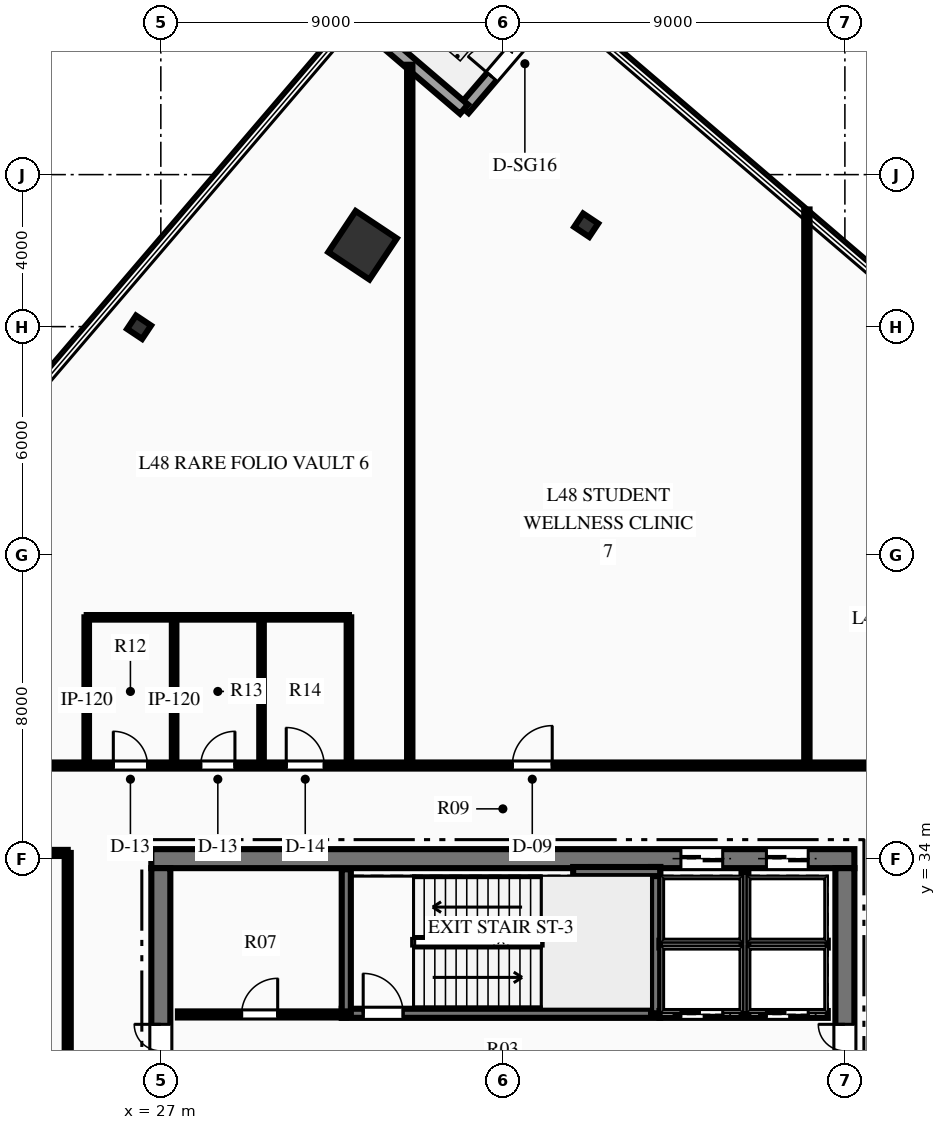
"""IFC4 building model, lengths in metres.
Left out: names, types, materials, properties, quantities, classifications, styles, units other than length and angle.
Written with IfcOpenShell. Run it as: python <this file> out.ifc"""

import sys

from ifc_helpers import new_model, si_unit, direction, frame, frame_2d, origin, origin_2d, place, context, subcontext, project, spatial, rectangle, hollow_rectangle, i_section, extrude, element, fill, save


model = new_model("IFC4")
c1 = context("Model", 3, precision=1e-05, world=origin(), true_north=direction((0.0, 1.0)))
c2 = subcontext(c1, "Body", "Model", "MODEL_VIEW")
j1 = project(units=[si_unit("LENGTHUNIT", "METRE"), si_unit("PLANEANGLEUNIT", "RADIAN")], contexts=[c1])
p1 = place(None, origin())
s1 = spatial("IfcSite", under=j1, at=p1, CompositionType="ELEMENT")
p2 = place(p1, origin())
s2 = spatial("IfcBuilding", under=s1, at=p2, CompositionType="ELEMENT")
p3 = place(p2, frame((0.0, 0.0, 193.95)))
s3 = spatial("IfcBuildingStorey", under=s2, at=p3, CompositionType="ELEMENT", Elevation=193.95)
p4 = place(p3, frame((26.75, 34.0, 0.0), z_axis=(0.0, 0.0, 1.0), x_axis=(1.0, 0.0, 0.0)))
e1 = element("IfcWall", 1, at=p4, inside=s3, PredefinedType="SHEAR", context=c2, shape_type="SweptSolid", body=[
    extrude(rectangle(XDim=18.5, YDim=0.5, at=frame_2d((9.25, 0.0))), origin(), (0.0, 0.0, 1.0), 4.5),
])
p5 = place(p4, frame((13.935, 0.0, 0.0)))
e2 = element("IfcOpeningElement", 2, at=p5, cuts=e1, PredefinedType="OPENING", context=c2, shape_type="SweptSolid", body=[
    extrude(rectangle(XDim=1.1, YDim=2.15, at=frame_2d((0.55, 1.075))), frame((0.0, 0.26, 0.0), z_axis=(0.0, -1.0, 0.0), x_axis=(1.0, 0.0, 0.0)), (0.0, 0.0, 1.0), 0.52),
])
p6 = place(p4, frame((16.185, 0.0, 0.0)))
e3 = element("IfcOpeningElement", 3, at=p6, cuts=e1, PredefinedType="OPENING", context=c2, shape_type="SweptSolid", body=[
    extrude(rectangle(XDim=1.1, YDim=2.15, at=frame_2d((0.55, 1.075))), frame((0.0, 0.26, 0.0), z_axis=(0.0, -1.0, 0.0), x_axis=(1.0, 0.0, 0.0)), (0.0, 0.0, 1.0), 0.52),
])
p7 = place(p3, frame((27.0, 18.25, 0.0), z_axis=(0.0, 0.0, 1.0), x_axis=(0.0, 1.0, 0.0)))
e4 = element("IfcWall", 4, at=p7, inside=s3, PredefinedType="SHEAR", context=c2, shape_type="SweptSolid", body=[
    extrude(rectangle(XDim=15.5, YDim=0.5, at=frame_2d((7.75, 0.0))), origin(), (0.0, 0.0, 1.0), 4.5),
])
p8 = place(p7, frame((9.99, 0.0, 0.0)))
e5 = element("IfcOpeningElement", 5, at=p8, cuts=e4, PredefinedType="OPENING", context=c2, shape_type="SweptSolid", body=[
    extrude(rectangle(XDim=1.4, YDim=2.2, at=frame_2d((0.7, 1.1))), frame((0.0, 0.26, 0.0), z_axis=(0.0, -1.0, 0.0), x_axis=(1.0, 0.0, 0.0)), (0.0, 0.0, 1.0), 0.52),
])
p9 = place(p3, frame((45.0, 18.25, 0.0), z_axis=(0.0, 0.0, 1.0), x_axis=(0.0, 1.0, 0.0)))
e6 = element("IfcWall", 6, at=p9, inside=s3, PredefinedType="SHEAR", context=c2, shape_type="SweptSolid", body=[
    extrude(rectangle(XDim=15.5, YDim=0.5, at=frame_2d((7.75, 0.0))), origin(), (0.0, 0.0, 1.0), 4.5),
])
p10 = place(p9, frame((9.99, 0.0, 0.0)))
e7 = element("IfcOpeningElement", 7, at=p10, cuts=e6, PredefinedType="OPENING", context=c2, shape_type="SweptSolid", body=[
    extrude(rectangle(XDim=1.4, YDim=2.2, at=frame_2d((0.7, 1.1))), frame((0.0, 0.26, 0.0), z_axis=(0.0, -1.0, 0.0), x_axis=(1.0, 0.0, 0.0)), (0.0, 0.0, 1.0), 0.52),
])
p11 = place(p3, frame((31.76, 29.93, 0.0), z_axis=(0.0, 0.0, 1.0), x_axis=(1.0, 0.0, 0.0)))
e8 = element("IfcWall", 8, at=p11, inside=s3, PredefinedType="SHEAR", context=c2, shape_type="SweptSolid", body=[
    extrude(rectangle(XDim=8.38, YDim=0.24, at=frame_2d((4.19, 0.0))), origin(), (0.0, 0.0, 1.0), 4.5),
])
p12 = place(p11, frame((0.565, 0.0, 0.0)))
e9 = element("IfcOpeningElement", 9, at=p12, cuts=e8, PredefinedType="OPENING", context=c2, shape_type="SweptSolid", body=[
    extrude(rectangle(XDim=1.05, YDim=2.15, at=frame_2d((0.525, 1.075))), frame((0.0, 0.13, 0.0), z_axis=(0.0, -1.0, 0.0), x_axis=(1.0, 0.0, 0.0)), (0.0, 0.0, 1.0), 0.26),
])
p13 = place(p3, frame((31.88, 29.93, 0.0), z_axis=(0.0, 0.0, 1.0), x_axis=(0.0, 1.0, 0.0)))
e10 = element("IfcWall", 10, at=p13, inside=s3, PredefinedType="SHEAR", context=c2, shape_type="SweptSolid", body=[
    extrude(rectangle(XDim=3.79, YDim=0.24, at=frame_2d((1.895, 0.0))), origin(), (0.0, 0.0, 1.0), 4.5),
])
p14 = place(p3, frame((40.02, 29.93, 0.0), z_axis=(0.0, 0.0, 1.0), x_axis=(0.0, 1.0, 0.0)))
e11 = element("IfcWall", 11, at=p14, inside=s3, PredefinedType="SHEAR", context=c2, shape_type="SweptSolid", body=[
    extrude(rectangle(XDim=3.85, YDim=0.24, at=frame_2d((1.925, 0.0))), origin(), (0.0, 0.0, 1.0), 4.5),
])
p15 = place(p3, frame((37.85, 33.66, 0.0), z_axis=(0.0, 0.0, 1.0), x_axis=(1.0, 0.0, 0.0)))
e12 = element("IfcWall", 12, at=p15, inside=s3, PredefinedType="SHEAR", context=c2, shape_type="SweptSolid", body=[
    extrude(rectangle(XDim=2.29, YDim=0.24, at=frame_2d((1.145, 0.0))), origin(), (0.0, 0.0, 1.0), 4.5),
])
p16 = place(p3, frame((32.308, 50.141, 0.0), z_axis=(0.0, 0.0, 1.0), x_axis=(0.554118199338, 0.832437998389, 0.0)))
e13 = element("IfcColumn", 13, at=p16, inside=s3, PredefinedType="COLUMN", context=c2, shape_type="SweptSolid", body=[
    extrude(hollow_rectangle(XDim=1.3, YDim=1.3, WallThickness=0.06, at=origin_2d()), origin(), (0.0, 0.0, 1.0), 4.5),
])
for number, where, z_axis, x_axis in (
    (14, (38.193, 50.668, 0.0), (0.0, 0.0, 1.0), (0.554, 0.832, 0.0)),
    (15, (26.428, 47.984, 0.0), (0.0, 0.0, 1.0), (0.554, 0.832, 0.0)),
):
    element("IfcColumn", number, at=place(p3, frame(where, z_axis=z_axis, x_axis=x_axis)), inside=s3, PredefinedType="COLUMN", context=c2, shape_type="SweptSolid", body=[
        extrude(i_section(OverallWidth=0.424, OverallDepth=0.474, WebThickness=0.048, FlangeThickness=0.077, at=origin_2d()), origin(), (0.0, 0.0, 1.0), 4.5),
    ])
p17 = place(p3, frame((34.977, 53.723, 0.0), z_axis=(0.0, 0.0, 1.0), x_axis=(0.650105449276, 0.759844000319, 0.0)))
e16 = element("IfcWall", 16, at=p17, inside=s3, PredefinedType="STANDARD", context=c2, shape_type="SweptSolid", body=[
    extrude(rectangle(XDim=3.9, YDim=0.32, at=frame_2d((1.95, 0.0))), origin(), (0.0, 0.0, 1.0), 4.22),
])
p18 = place(p17, frame((1.125, 0.0, 0.0)))
e17 = element("IfcOpeningElement", 17, at=p18, cuts=e16, PredefinedType="OPENING", context=c2, shape_type="SweptSolid", body=[
    extrude(rectangle(XDim=1.65, YDim=2.35, at=frame_2d((0.825, 1.175))), frame((0.0, 0.17, 0.0), z_axis=(0.0, -1.0, 0.0), x_axis=(1.0, 0.0, 0.0)), (0.0, 0.0, 1.0), 0.34),
])
p19 = place(p3, frame((32.014, 56.258, 0.0), z_axis=(0.0, 0.0, 1.0), x_axis=(0.759844000319, -0.650105449276, 0.0)))
e18 = element("IfcWall", 18, at=p19, inside=s3, PredefinedType="STANDARD", context=c2, shape_type="SweptSolid", body=[
    extrude(rectangle(XDim=3.9, YDim=0.32, at=frame_2d((1.95, 0.0))), origin(), (0.0, 0.0, 1.0), 4.22),
])
p20 = place(p3, frame((27.45, 29.9, 0.0), z_axis=(0.0, 0.0, 1.0), x_axis=(1.0, 0.0, 0.0)))
e19 = element("IfcWall", 19, at=p20, inside=s3, PredefinedType="PARTITIONING", context=c2, shape_type="SweptSolid", body=[
    extrude(rectangle(XDim=4.43, YDim=0.16, at=frame_2d((2.215, 0.0))), origin(), (0.0, 0.0, 1.0), 4.22),
])
p21 = place(p20, frame((1.675, 0.0, 0.0)))
e20 = element("IfcOpeningElement", 20, at=p21, cuts=e19, PredefinedType="OPENING", context=c2, shape_type="SweptSolid", body=[
    extrude(rectangle(XDim=0.95, YDim=2.15, at=frame_2d((0.475, 1.075))), frame((0.0, 0.09, 0.0), z_axis=(0.0, -1.0, 0.0), x_axis=(1.0, 0.0, 0.0)), (0.0, 0.0, 1.0), 0.18),
])
p22 = place(p3, frame((40.12, 29.9, 0.0), z_axis=(0.0, 0.0, 1.0), x_axis=(1.0, 0.0, 0.0)))
e21 = element("IfcWall", 21, at=p22, inside=s3, PredefinedType="PARTITIONING", context=c2, shape_type="SweptSolid", body=[
    extrude(rectangle(XDim=4.43, YDim=0.18, at=frame_2d((2.215, 0.0))), origin(), (0.0, 0.0, 1.0), 4.22),
])
p23 = place(p22, frame((0.565, 0.0, 0.0)))
e22 = element("IfcOpeningElement", 22, at=p23, cuts=e21, PredefinedType="OPENING", context=c2, shape_type="SweptSolid", body=[
    extrude(rectangle(XDim=1.1, YDim=2.15, at=frame_2d((0.55, 1.075))), frame((0.0, 0.1, 0.0), z_axis=(0.0, -1.0, 0.0), x_axis=(1.0, 0.0, 0.0)), (0.0, 0.0, 1.0), 0.2),
])
p24 = place(p22, frame((2.815, 0.0, 0.0)))
e23 = element("IfcOpeningElement", 23, at=p24, cuts=e21, PredefinedType="OPENING", context=c2, shape_type="SweptSolid", body=[
    extrude(rectangle(XDim=1.1, YDim=2.15, at=frame_2d((0.55, 1.075))), frame((0.0, 0.1, 0.0), z_axis=(0.0, -1.0, 0.0), x_axis=(1.0, 0.0, 0.0)), (0.0, 0.0, 1.0), 0.2),
])
p25 = place(p3, frame((40.12, 31.75, 0.0), z_axis=(0.0, 0.0, 1.0), x_axis=(1.0, 0.0, 0.0)))
e24 = element("IfcWall", 24, at=p25, inside=s3, PredefinedType="PARTITIONING", context=c2, shape_type="SweptSolid", body=[
    extrude(rectangle(XDim=4.43, YDim=0.18, at=frame_2d((2.215, 0.0))), origin(), (0.0, 0.0, 1.0), 4.22),
])
p26 = place(p3, frame((42.37, 29.9, 0.0), z_axis=(0.0, 0.0, 1.0), x_axis=(0.0, 1.0, 0.0)))
e25 = element("IfcWall", 25, at=p26, inside=s3, PredefinedType="PARTITIONING", context=c2, shape_type="SweptSolid", body=[
    extrude(rectangle(XDim=3.75, YDim=0.18, at=frame_2d((1.875, 0.0))), origin(), (0.0, 0.0, 1.0), 4.22),
])
p27 = place(p3, frame((18.2, 36.45, 0.0), z_axis=(0.0, 0.0, 1.0), x_axis=(1.0, 0.0, 0.0)))
e26 = element("IfcWall", 26, at=p27, inside=s3, PredefinedType="PARTITIONING", context=c2, shape_type="SweptSolid", body=[
    extrude(rectangle(XDim=35.6, YDim=0.16, at=frame_2d((17.8, 0.0))), origin(), (0.0, 0.0, 1.0), 3.599),
])
p28 = place(p27, frame((7.55, 0.0, 0.0)))
e27 = element("IfcOpeningElement", 27, at=p28, cuts=e26, PredefinedType="OPENING", context=c2, shape_type="SweptSolid", body=[
    extrude(rectangle(XDim=0.9, YDim=2.15, at=frame_2d((0.45, 1.075))), frame((0.0, 0.09, 0.0), z_axis=(0.0, -1.0, 0.0), x_axis=(1.0, 0.0, 0.0)), (0.0, 0.0, 1.0), 0.18),
])
p29 = place(p27, frame((9.85, 0.0, 0.0)))
e28 = element("IfcOpeningElement", 28, at=p29, cuts=e26, PredefinedType="OPENING", context=c2, shape_type="SweptSolid", body=[
    extrude(rectangle(XDim=0.9, YDim=2.15, at=frame_2d((0.45, 1.075))), frame((0.0, 0.09, 0.0), z_axis=(0.0, -1.0, 0.0), x_axis=(1.0, 0.0, 0.0)), (0.0, 0.0, 1.0), 0.18),
])
p30 = place(p27, frame((12.1, 0.0, 0.0)))
e29 = element("IfcOpeningElement", 29, at=p30, cuts=e26, PredefinedType="OPENING", context=c2, shape_type="SweptSolid", body=[
    extrude(rectangle(XDim=1.0, YDim=2.15, at=frame_2d((0.5, 1.075))), frame((0.0, 0.09, 0.0), z_axis=(0.0, -1.0, 0.0), x_axis=(1.0, 0.0, 0.0)), (0.0, 0.0, 1.0), 0.18),
])
p31 = place(p27, frame((4.345, 0.0, 0.0)))
e30 = element("IfcOpeningElement", 30, at=p31, cuts=e26, PredefinedType="OPENING", context=c2, shape_type="SweptSolid", body=[
    extrude(rectangle(XDim=1.05, YDim=2.15, at=frame_2d((0.525, 1.075))), frame((0.0, 0.09, 0.0), z_axis=(0.0, -1.0, 0.0), x_axis=(1.0, 0.0, 0.0)), (0.0, 0.0, 1.0), 0.18),
])
p32 = place(p27, frame((18.049, 0.0, 0.0)))
e31 = element("IfcOpeningElement", 31, at=p32, cuts=e26, PredefinedType="OPENING", context=c2, shape_type="SweptSolid", body=[
    extrude(rectangle(XDim=1.05, YDim=2.15, at=frame_2d((0.525, 1.075))), frame((0.0, 0.09, 0.0), z_axis=(0.0, -1.0, 0.0), x_axis=(1.0, 0.0, 0.0)), (0.0, 0.0, 1.0), 0.18),
])
p33 = place(p27, frame((31.833, 0.0, 0.0)))
e32 = element("IfcOpeningElement", 32, at=p33, cuts=e26, PredefinedType="OPENING", context=c2, shape_type="SweptSolid", body=[
    extrude(rectangle(XDim=1.05, YDim=2.15, at=frame_2d((0.525, 1.075))), frame((0.0, 0.09, 0.0), z_axis=(0.0, -1.0, 0.0), x_axis=(1.0, 0.0, 0.0)), (0.0, 0.0, 1.0), 0.18),
])
p34 = place(p3, frame((18.2, 34.15, 0.0), z_axis=(0.0, 0.0, 1.0), x_axis=(1.0, 0.0, 0.0)))
e33 = element("IfcWall", 33, at=p34, inside=s3, PredefinedType="PARTITIONING", context=c2, shape_type="SweptSolid", body=[
    extrude(rectangle(XDim=6.35, YDim=0.16, at=frame_2d((3.175, 0.0))), origin(), (0.0, 0.0, 1.0), 4.22),
])
p35 = place(p3, frame((24.55, 17.85, 0.0), z_axis=(0.0, 0.0, 1.0), x_axis=(0.0, 1.0, 0.0)))
e34 = element("IfcWall", 34, at=p35, inside=s3, PredefinedType="PARTITIONING", context=c2, shape_type="SweptSolid", body=[
    extrude(rectangle(XDim=16.3, YDim=0.16, at=frame_2d((8.15, 0.0))), origin(), (0.0, 0.0, 1.0), 4.22),
])
p36 = place(p35, frame((2.775, 0.0, 0.0)))
e35 = element("IfcOpeningElement", 35, at=p36, cuts=e34, PredefinedType="OPENING", context=c2, shape_type="SweptSolid", body=[
    extrude(rectangle(XDim=0.95, YDim=2.15, at=frame_2d((0.475, 1.075))), frame((0.0, 0.09, 0.0), z_axis=(0.0, -1.0, 0.0), x_axis=(1.0, 0.0, 0.0)), (0.0, 0.0, 1.0), 0.18),
])
p37 = place(p35, frame((8.729, 0.0, 0.0)))
e36 = element("IfcOpeningElement", 36, at=p37, cuts=e34, PredefinedType="OPENING", context=c2, shape_type="SweptSolid", body=[
    extrude(rectangle(XDim=1.05, YDim=2.15, at=frame_2d((0.525, 1.075))), frame((0.0, 0.09, 0.0), z_axis=(0.0, -1.0, 0.0), x_axis=(1.0, 0.0, 0.0)), (0.0, 0.0, 1.0), 0.18),
])
for number, where, z_axis, x_axis in (
    (37, (25.05, 36.45, 0.0), (0.0, 0.0, 1.0), (0.0, 1.0, 0.0)),
    (38, (27.35, 36.45, 0.0), (0.0, 0.0, 1.0), (0.0, 1.0, 0.0)),
    (39, (29.65, 36.45, 0.0), (0.0, 0.0, 1.0), (0.0, 1.0, 0.0)),
):
    element("IfcWall", number, at=place(p3, frame(where, z_axis=z_axis, x_axis=x_axis)), inside=s3, PredefinedType="PARTITIONING", context=c2, shape_type="SweptSolid", body=[
        extrude(rectangle(XDim=3.9, YDim=0.12, at=frame_2d((1.95, 0.0))), origin(), (0.0, 0.0, 1.0), 4.22),
    ])
p38 = place(p3, frame((31.95, 36.45, 0.0), z_axis=(0.0, 0.0, 1.0), x_axis=(0.0, 1.0, 0.0)))
e40 = element("IfcWall", 40, at=p38, inside=s3, PredefinedType="PARTITIONING", context=c2, shape_type="SweptSolid", body=[
    extrude(rectangle(XDim=3.9, YDim=0.12, at=frame_2d((1.95, 0.0))), origin(), (0.0, 0.0, 1.0), 3.599),
])
p39 = place(p3, frame((25.05, 40.35, 0.0), z_axis=(0.0, 0.0, 1.0), x_axis=(1.0, 0.0, 0.0)))
e41 = element("IfcWall", 41, at=p39, inside=s3, PredefinedType="PARTITIONING", context=c2, shape_type="SweptSolid", body=[
    extrude(rectangle(XDim=6.9, YDim=0.12, at=frame_2d((3.45, 0.0))), origin(), (0.0, 0.0, 1.0), 4.22),
])
p40 = place(p3, frame((33.55, 36.45, 0.0), z_axis=(0.0, 0.0, 1.0), x_axis=(0.0, 1.0, 0.0)))
e42 = element("IfcWall", 42, at=p40, inside=s3, PredefinedType="PARTITIONING", context=c2, shape_type="SweptSolid", body=[
    extrude(rectangle(XDim=18.441, YDim=0.14, at=frame_2d((9.221, 0.0))), origin(), (0.0, 0.0, 1.0), 4.22),
])
p41 = place(p3, frame((44.0, 36.45, 0.0), z_axis=(0.0, 0.0, 1.0), x_axis=(0.0, 1.0, 0.0)))
e43 = element("IfcWall", 43, at=p41, inside=s3, PredefinedType="PARTITIONING", context=c2, shape_type="SweptSolid", body=[
    extrude(rectangle(XDim=14.633, YDim=0.14, at=frame_2d((7.316, 0.0))), origin(), (0.0, 0.0, 1.0), 4.22),
])
p42 = place(p18, origin())
e44 = element("IfcDoor", 44, at=p42, inside=s3, OperationType="DOUBLE_DOOR_SINGLE_SWING", PredefinedType="DOOR", context=c2, shape_type="SweptSolid", body=[
    extrude(rectangle(XDim=1.65, YDim=2.35, at=frame_2d((0.825, 1.175))), frame((0.0, 0.025, 0.0), z_axis=(0.0, -1.0, 0.0), x_axis=(1.0, 0.0, 0.0)), (0.0, 0.0, 1.0), 0.05),
])
fill(e17, e44)
p43 = place(p21, origin())
e45 = element("IfcDoor", 45, at=p43, inside=s3, OperationType="SINGLE_SWING_RIGHT", PredefinedType="DOOR", context=c2, shape_type="SweptSolid", body=[
    extrude(rectangle(XDim=0.95, YDim=2.15, at=frame_2d((0.475, 1.075))), frame((0.0, 0.025, 0.0), z_axis=(0.0, -1.0, 0.0), x_axis=(1.0, 0.0, 0.0)), (0.0, 0.0, 1.0), 0.05),
])
fill(e20, e45)
p44 = place(p12, origin())
e46 = element("IfcDoor", 46, at=p44, inside=s3, OperationType="SINGLE_SWING_LEFT", PredefinedType="DOOR", context=c2, shape_type="SweptSolid", body=[
    extrude(rectangle(XDim=1.05, YDim=2.15, at=frame_2d((0.525, 1.075))), frame((0.0, 0.025, 0.0), z_axis=(0.0, -1.0, 0.0), x_axis=(1.0, 0.0, 0.0)), (0.0, 0.0, 1.0), 0.05),
])
fill(e9, e46)
p45 = place(p8, origin())
e47 = element("IfcDoor", 47, at=p45, inside=s3, OperationType="DOUBLE_DOOR_SINGLE_SWING", PredefinedType="DOOR", context=c2, shape_type="SweptSolid", body=[
    extrude(rectangle(XDim=1.4, YDim=2.2, at=frame_2d((0.7, 1.1))), frame((0.0, 0.025, 0.0), z_axis=(0.0, -1.0, 0.0), x_axis=(1.0, 0.0, 0.0)), (0.0, 0.0, 1.0), 0.05),
])
fill(e5, e47)
p46 = place(p10, origin())
e48 = element("IfcDoor", 48, at=p46, inside=s3, OperationType="DOUBLE_DOOR_SINGLE_SWING", PredefinedType="DOOR", context=c2, shape_type="SweptSolid", body=[
    extrude(rectangle(XDim=1.4, YDim=2.2, at=frame_2d((0.7, 1.1))), frame((0.0, 0.025, 0.0), z_axis=(0.0, -1.0, 0.0), x_axis=(1.0, 0.0, 0.0)), (0.0, 0.0, 1.0), 0.05),
])
fill(e7, e48)
p47 = place(p28, origin())
e49 = element("IfcDoor", 49, at=p47, inside=s3, OperationType="SINGLE_SWING_LEFT", PredefinedType="DOOR", context=c2, shape_type="SweptSolid", body=[
    extrude(rectangle(XDim=0.9, YDim=2.15, at=frame_2d((0.45, 1.075))), frame((0.0, 0.025, 0.0), z_axis=(0.0, -1.0, 0.0), x_axis=(1.0, 0.0, 0.0)), (0.0, 0.0, 1.0), 0.05),
])
fill(e27, e49)
p48 = place(p29, origin())
e50 = element("IfcDoor", 50, at=p48, inside=s3, OperationType="SINGLE_SWING_RIGHT", PredefinedType="DOOR", context=c2, shape_type="SweptSolid", body=[
    extrude(rectangle(XDim=0.9, YDim=2.15, at=frame_2d((0.45, 1.075))), frame((0.0, 0.025, 0.0), z_axis=(0.0, -1.0, 0.0), x_axis=(1.0, 0.0, 0.0)), (0.0, 0.0, 1.0), 0.05),
])
fill(e28, e50)
p49 = place(p30, origin())
e51 = element("IfcDoor", 51, at=p49, inside=s3, OperationType="SINGLE_SWING_LEFT", PredefinedType="DOOR", context=c2, shape_type="SweptSolid", body=[
    extrude(rectangle(XDim=1.0, YDim=2.15, at=frame_2d((0.5, 1.075))), frame((0.0, 0.025, 0.0), z_axis=(0.0, -1.0, 0.0), x_axis=(1.0, 0.0, 0.0)), (0.0, 0.0, 1.0), 0.05),
])
fill(e29, e51)
p50 = place(p32, origin())
e52 = element("IfcDoor", 52, at=p50, inside=s3, OperationType="SINGLE_SWING_RIGHT", PredefinedType="DOOR", context=c2, shape_type="SweptSolid", body=[
    extrude(rectangle(XDim=1.05, YDim=2.15, at=frame_2d((0.525, 1.075))), frame((0.0, 0.025, 0.0), z_axis=(0.0, -1.0, 0.0), x_axis=(1.0, 0.0, 0.0)), (0.0, 0.0, 1.0), 0.05),
])
fill(e31, e52)
p51 = place(p23, origin())
e53 = element("IfcDoor", 53, at=p51, inside=s3, OperationType="SLIDING_TO_LEFT", PredefinedType="DOOR", context=c2, shape_type="SweptSolid", body=[
    extrude(rectangle(XDim=1.1, YDim=2.15, at=frame_2d((0.55, 1.075))), frame((0.0, 0.025, 0.0), z_axis=(0.0, -1.0, 0.0), x_axis=(1.0, 0.0, 0.0)), (0.0, 0.0, 1.0), 0.05),
])
fill(e22, e53)
p52 = place(p24, origin())
e54 = element("IfcDoor", 54, at=p52, inside=s3, OperationType="SLIDING_TO_LEFT", PredefinedType="DOOR", context=c2, shape_type="SweptSolid", body=[
    extrude(rectangle(XDim=1.1, YDim=2.15, at=frame_2d((0.55, 1.075))), frame((0.0, 0.025, 0.0), z_axis=(0.0, -1.0, 0.0), x_axis=(1.0, 0.0, 0.0)), (0.0, 0.0, 1.0), 0.05),
])
fill(e23, e54)
p53 = place(p5, origin())
e55 = element("IfcDoor", 55, at=p53, inside=s3, OperationType="SLIDING_TO_LEFT", PredefinedType="DOOR", context=c2, shape_type="SweptSolid", body=[
    extrude(rectangle(XDim=1.1, YDim=2.15, at=frame_2d((0.55, 1.075))), frame((0.0, 0.025, 0.0), z_axis=(0.0, -1.0, 0.0), x_axis=(1.0, 0.0, 0.0)), (0.0, 0.0, 1.0), 0.05),
])
fill(e2, e55)
p54 = place(p6, origin())
e56 = element("IfcDoor", 56, at=p54, inside=s3, OperationType="SLIDING_TO_LEFT", PredefinedType="DOOR", context=c2, shape_type="SweptSolid", body=[
    extrude(rectangle(XDim=1.1, YDim=2.15, at=frame_2d((0.55, 1.075))), frame((0.0, 0.025, 0.0), z_axis=(0.0, -1.0, 0.0), x_axis=(1.0, 0.0, 0.0)), (0.0, 0.0, 1.0), 0.05),
])
fill(e3, e56)
save(model, sys.argv[1])
